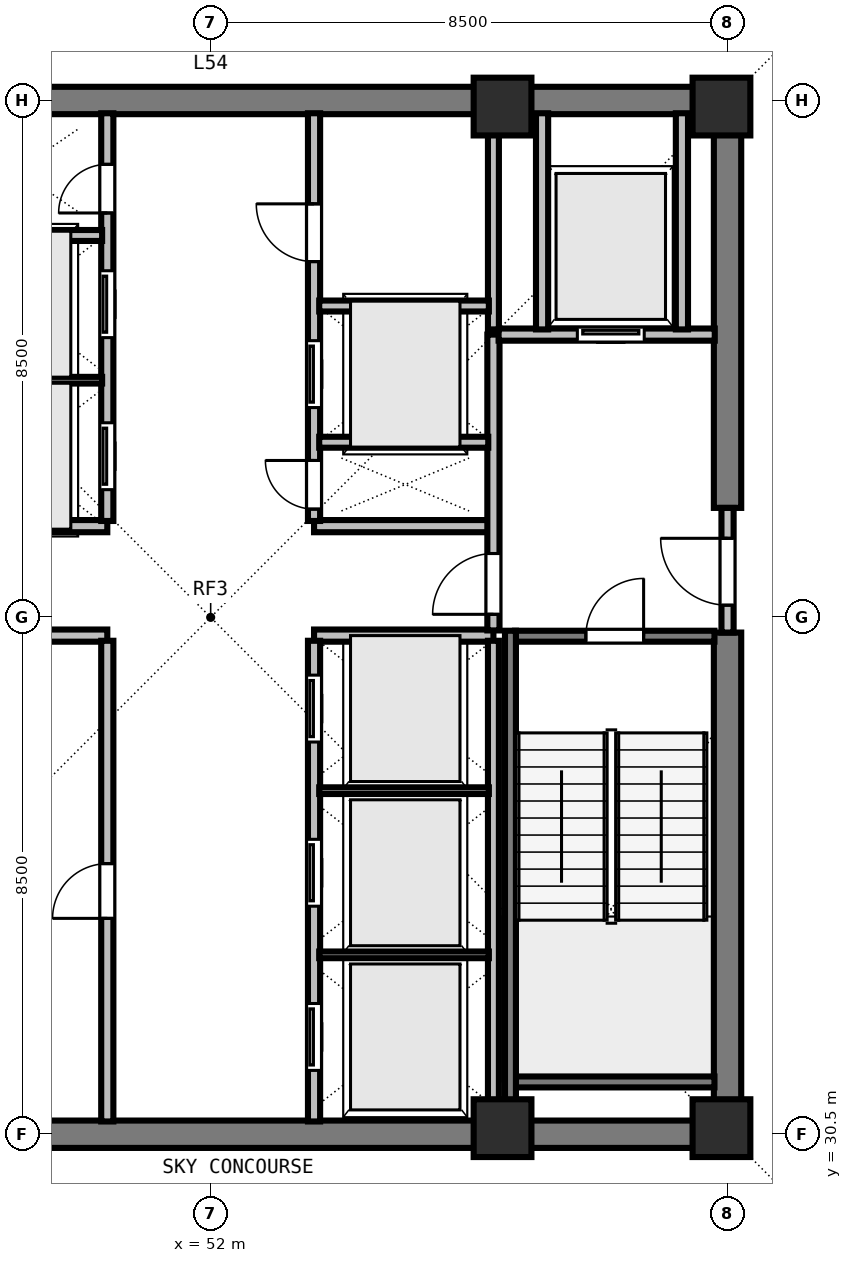
"""IFC4 building model, lengths in metres.
Left out: names, types, materials, properties, quantities, classifications, styles, units other than length and angle.
Written with IfcOpenShell. Run it as: python <this file> out.ifc"""

import sys

from ifc_helpers import new_model, si_unit, direction, frame, frame_2d, origin, origin_2d, place, context, subcontext, project, spatial, rectangle, extrude, element, fill, save


model = new_model("IFC4")
c1 = context("Model", 3, precision=1e-05, world=origin(), true_north=direction((0.0, 1.0)))
c2 = subcontext(c1, "Body", "Model", "MODEL_VIEW")
j1 = project(units=[si_unit("LENGTHUNIT", "METRE"), si_unit("PLANEANGLEUNIT", "RADIAN")], contexts=[c1])
p1 = place(None, origin())
s1 = spatial("IfcSite", under=j1, at=p1, CompositionType="ELEMENT")
p2 = place(p1, origin())
s2 = spatial("IfcBuilding", under=s1, at=p2, CompositionType="ELEMENT")
p3 = place(p2, frame((0.0, 0.0, 198.0)))
s3 = spatial("IfcBuildingStorey", under=s2, at=p3, CompositionType="ELEMENT", Elevation=198.0)
for number, where, z_axis, x_axis in (
    (1, (56.8, 30.6, 0.0), (0.0, 0.0, 1.0), (1.0, 0.0, 0.0)),
    (2, (60.4, 30.6, 0.0), (0.0, 0.0, 1.0), (1.0, 0.0, 0.0)),
    (3, (56.8, 47.4, 0.0), (0.0, 0.0, 1.0), (1.0, 0.0, 0.0)),
    (4, (60.4, 47.4, 0.0), (0.0, 0.0, 1.0), (1.0, 0.0, 0.0)),
):
    element("IfcColumn", number, at=place(p3, frame(where, z_axis=z_axis, x_axis=x_axis)), inside=s3, PredefinedType="COLUMN", context=c2, shape_type="SweptSolid", body=[
        extrude(rectangle(XDim=0.95, YDim=0.95, at=origin_2d()), origin(), (0.0, 0.0, 1.0), 4.5),
    ])
for number, where, z_axis, x_axis in (
    (5, (43.275, 30.5, 0.0), (0.0, 0.0, 1.0), (1.0, 0.0, 0.0)),
    (6, (43.275, 47.5, 0.0), (0.0, 0.0, 1.0), (1.0, 0.0, 0.0)),
):
    element("IfcWall", number, at=place(p3, frame(where, z_axis=z_axis, x_axis=x_axis)), inside=s3, PredefinedType="SHEAR", context=c2, shape_type="SweptSolid", body=[
        extrude(rectangle(XDim=17.45, YDim=0.45, at=frame_2d((8.725, 0.0))), origin(), (0.0, 0.0, 1.0), 4.29),
    ])
p4 = place(p3, frame((60.5, 30.715, 0.0), z_axis=(0.0, 0.0, 1.0), x_axis=(0.0, 1.0, 0.0)))
e7 = element("IfcWall", 7, at=p4, inside=s3, PredefinedType="SHEAR", context=c2, shape_type="SweptSolid", body=[
    extrude(rectangle(XDim=8.035, YDim=0.45, at=frame_2d((4.018, 0.0))), origin(), (0.0, 0.0, 1.0), 4.29),
])
p5 = place(p3, frame((60.5, 40.8, 0.0), z_axis=(0.0, 0.0, 1.0), x_axis=(0.0, 1.0, 0.0)))
e8 = element("IfcWall", 8, at=p5, inside=s3, PredefinedType="SHEAR", context=c2, shape_type="SweptSolid", body=[
    extrude(rectangle(XDim=6.485, YDim=0.45, at=frame_2d((3.242, 0.0))), origin(), (0.0, 0.0, 1.0), 4.29),
])
for number, where, z_axis, x_axis in (
    (9, (47.35, 38.7, 0.0), (0.0, 0.0, 1.0), (1.0, 0.0, 0.0)),
    (10, (47.35, 40.5, 0.0), (0.0, 0.0, 1.0), (1.0, 0.0, 0.0)),
    (11, (53.7, 38.7, 0.0), (0.0, 0.0, 1.0), (1.0, 0.0, 0.0)),
    (12, (53.7, 40.5, 0.0), (0.0, 0.0, 1.0), (1.0, 0.0, 0.0)),
):
    element("IfcWall", number, at=place(p3, frame(where, z_axis=z_axis, x_axis=x_axis)), inside=s3, PredefinedType="SOLIDWALL", context=c2, shape_type="SweptSolid", body=[
        extrude(rectangle(XDim=2.95, YDim=0.2, at=frame_2d((1.475, 0.0))), origin(), (0.0, 0.0, 1.0), 4.29),
    ])
p6 = place(p3, frame((50.3, 30.71, 0.0), z_axis=(0.0, 0.0, 1.0), x_axis=(0.0, 1.0, 0.0)))
e13 = element("IfcWall", 13, at=p6, inside=s3, PredefinedType="SOLIDWALL", context=c2, shape_type="SweptSolid", body=[
    extrude(rectangle(XDim=7.905, YDim=0.2, at=frame_2d((3.953, 0.0))), origin(), (0.0, 0.0, 1.0), 4.29),
])
p7 = place(p6, frame((3.34, 0.0, 0.0)))
e14 = element("IfcOpeningElement", 14, at=p7, cuts=e13, PredefinedType="OPENING", context=c2, shape_type="SweptSolid", body=[
    extrude(rectangle(XDim=0.9, YDim=2.12, at=frame_2d((0.45, 1.06))), frame((0.0, 0.11, 0.0), z_axis=(0.0, -1.0, 0.0), x_axis=(1.0, 0.0, 0.0)), (0.0, 0.0, 1.0), 0.22),
])
p8 = place(p3, frame((53.7, 30.71, 0.0), z_axis=(0.0, 0.0, 1.0), x_axis=(0.0, 1.0, 0.0)))
e15 = element("IfcWall", 15, at=p8, inside=s3, PredefinedType="SOLIDWALL", context=c2, shape_type="SweptSolid", body=[
    extrude(rectangle(XDim=7.905, YDim=0.2, at=frame_2d((3.953, 0.0))), origin(), (0.0, 0.0, 1.0), 4.29),
])
p9 = place(p8, frame((0.84, 0.0, 0.0)))
e16 = element("IfcOpeningElement", 16, at=p9, cuts=e15, PredefinedType="OPENING", context=c2, shape_type="SweptSolid", body=[
    extrude(rectangle(XDim=1.1, YDim=2.2, at=frame_2d((0.55, 1.1))), frame((0.0, 0.11, 0.0), z_axis=(0.0, -1.0, 0.0), x_axis=(1.0, 0.0, 0.0)), (0.0, 0.0, 1.0), 0.22),
])
p10 = place(p8, frame((3.54, 0.0, 0.0)))
e17 = element("IfcOpeningElement", 17, at=p10, cuts=e15, PredefinedType="OPENING", context=c2, shape_type="SweptSolid", body=[
    extrude(rectangle(XDim=1.1, YDim=2.2, at=frame_2d((0.55, 1.1))), frame((0.0, 0.11, 0.0), z_axis=(0.0, -1.0, 0.0), x_axis=(1.0, 0.0, 0.0)), (0.0, 0.0, 1.0), 0.22),
])
p11 = place(p8, frame((6.24, 0.0, 0.0)))
e18 = element("IfcOpeningElement", 18, at=p11, cuts=e15, PredefinedType="OPENING", context=c2, shape_type="SweptSolid", body=[
    extrude(rectangle(XDim=1.1, YDim=2.2, at=frame_2d((0.55, 1.1))), frame((0.0, 0.11, 0.0), z_axis=(0.0, -1.0, 0.0), x_axis=(1.0, 0.0, 0.0)), (0.0, 0.0, 1.0), 0.22),
])
p12 = place(p3, frame((50.3, 40.585, 0.0), z_axis=(0.0, 0.0, 1.0), x_axis=(0.0, 1.0, 0.0)))
e19 = element("IfcWall", 19, at=p12, inside=s3, PredefinedType="SOLIDWALL", context=c2, shape_type="SweptSolid", body=[
    extrude(rectangle(XDim=6.705, YDim=0.2, at=frame_2d((3.353, 0.0))), origin(), (0.0, 0.0, 1.0), 4.29),
])
p13 = place(p12, frame((0.515, 0.0, 0.0)))
e20 = element("IfcOpeningElement", 20, at=p13, cuts=e19, PredefinedType="OPENING", context=c2, shape_type="SweptSolid", body=[
    extrude(rectangle(XDim=1.1, YDim=2.2, at=frame_2d((0.55, 1.1))), frame((0.0, 0.11, 0.0), z_axis=(0.0, -1.0, 0.0), x_axis=(1.0, 0.0, 0.0)), (0.0, 0.0, 1.0), 0.22),
])
p14 = place(p12, frame((3.015, 0.0, 0.0)))
e21 = element("IfcOpeningElement", 21, at=p14, cuts=e19, PredefinedType="OPENING", context=c2, shape_type="SweptSolid", body=[
    extrude(rectangle(XDim=1.1, YDim=2.2, at=frame_2d((0.55, 1.1))), frame((0.0, 0.11, 0.0), z_axis=(0.0, -1.0, 0.0), x_axis=(1.0, 0.0, 0.0)), (0.0, 0.0, 1.0), 0.22),
])
p15 = place(p12, frame((5.065, 0.0, 0.0)))
e22 = element("IfcOpeningElement", 22, at=p15, cuts=e19, PredefinedType="OPENING", context=c2, shape_type="SweptSolid", body=[
    extrude(rectangle(XDim=0.8, YDim=2.08, at=frame_2d((0.4, 1.04))), frame((0.0, 0.11, 0.0), z_axis=(0.0, -1.0, 0.0), x_axis=(1.0, 0.0, 0.0)), (0.0, 0.0, 1.0), 0.22),
])
p16 = place(p3, frame((53.7, 40.585, 0.0), z_axis=(0.0, 0.0, 1.0), x_axis=(0.0, 1.0, 0.0)))
e23 = element("IfcWall", 23, at=p16, inside=s3, PredefinedType="SOLIDWALL", context=c2, shape_type="SweptSolid", body=[
    extrude(rectangle(XDim=6.705, YDim=0.2, at=frame_2d((3.353, 0.0))), origin(), (0.0, 0.0, 1.0), 4.29),
])
p17 = place(p16, frame((0.195, 0.0, 0.0)))
e24 = element("IfcOpeningElement", 24, at=p17, cuts=e23, PredefinedType="OPENING", context=c2, shape_type="SweptSolid", body=[
    extrude(rectangle(XDim=0.8, YDim=2.08, at=frame_2d((0.4, 1.04))), frame((0.0, 0.11, 0.0), z_axis=(0.0, -1.0, 0.0), x_axis=(1.0, 0.0, 0.0)), (0.0, 0.0, 1.0), 0.22),
])
p18 = place(p16, frame((1.865, 0.0, 0.0)))
e25 = element("IfcOpeningElement", 25, at=p18, cuts=e23, PredefinedType="OPENING", context=c2, shape_type="SweptSolid", body=[
    extrude(rectangle(XDim=1.1, YDim=2.2, at=frame_2d((0.55, 1.1))), frame((0.0, 0.11, 0.0), z_axis=(0.0, -1.0, 0.0), x_axis=(1.0, 0.0, 0.0)), (0.0, 0.0, 1.0), 0.22),
])
p19 = place(p16, frame((4.265, 0.0, 0.0)))
e26 = element("IfcOpeningElement", 26, at=p19, cuts=e23, PredefinedType="OPENING", context=c2, shape_type="SweptSolid", body=[
    extrude(rectangle(XDim=0.95, YDim=2.12, at=frame_2d((0.475, 1.06))), frame((0.0, 0.11, 0.0), z_axis=(0.0, -1.0, 0.0), x_axis=(1.0, 0.0, 0.0)), (0.0, 0.0, 1.0), 0.22),
])
p20 = place(p3, frame((60.5, 38.75, 0.0), z_axis=(0.0, 0.0, 1.0), x_axis=(0.0, 1.0, 0.0)))
e27 = element("IfcWall", 27, at=p20, inside=s3, PredefinedType="SOLIDWALL", context=c2, shape_type="SweptSolid", body=[
    extrude(rectangle(XDim=2.05, YDim=0.2, at=frame_2d((1.025, 0.0))), origin(), (0.0, 0.0, 1.0), 4.29),
])
p21 = place(p20, frame((0.45, 0.0, 0.0)))
e28 = element("IfcOpeningElement", 28, at=p21, cuts=e27, PredefinedType="OPENING", context=c2, shape_type="SweptSolid", body=[
    extrude(rectangle(XDim=1.1, YDim=2.15, at=frame_2d((0.55, 1.075))), frame((0.0, 0.11, 0.0), z_axis=(0.0, -1.0, 0.0), x_axis=(1.0, 0.0, 0.0)), (0.0, 0.0, 1.0), 0.22),
])
p22 = place(p3, frame((56.65, 38.785, 0.0), z_axis=(0.0, 0.0, 1.0), x_axis=(0.0, 1.0, 0.0)))
e29 = element("IfcWall", 29, at=p22, inside=s3, PredefinedType="SOLIDWALL", context=c2, shape_type="SweptSolid", body=[
    extrude(rectangle(XDim=4.865, YDim=0.2, at=frame_2d((2.433, 0.0))), origin(), (0.0, 0.0, 1.0), 4.29),
])
p23 = place(p22, frame((0.265, 0.0, 0.0)))
e30 = element("IfcOpeningElement", 30, at=p23, cuts=e29, PredefinedType="OPENING", context=c2, shape_type="SweptSolid", body=[
    extrude(rectangle(XDim=1.0, YDim=2.15, at=frame_2d((0.5, 1.075))), frame((0.0, 0.11, 0.0), z_axis=(0.0, -1.0, 0.0), x_axis=(1.0, 0.0, 0.0)), (0.0, 0.0, 1.0), 0.22),
])
p24 = place(p3, frame((56.735, 43.65, 0.0), z_axis=(0.0, 0.0, 1.0), x_axis=(1.0, 0.0, 0.0)))
e31 = element("IfcWall", 31, at=p24, inside=s3, PredefinedType="SOLIDWALL", context=c2, shape_type="SweptSolid", body=[
    extrude(rectangle(XDim=3.555, YDim=0.2, at=frame_2d((1.777, 0.0))), origin(), (0.0, 0.0, 1.0), 4.29),
])
p25 = place(p24, frame((1.295, 0.0, 0.0)))
e32 = element("IfcOpeningElement", 32, at=p25, cuts=e31, PredefinedType="OPENING", context=c2, shape_type="SweptSolid", body=[
    extrude(rectangle(XDim=1.1, YDim=2.2, at=frame_2d((0.55, 1.1))), frame((0.0, 0.11, 0.0), z_axis=(0.0, -1.0, 0.0), x_axis=(1.0, 0.0, 0.0)), (0.0, 0.0, 1.0), 0.22),
])
for number, where, z_axis, x_axis in (
    (33, (57.45, 43.735, 0.0), (0.0, 0.0, 1.0), (0.0, 1.0, 0.0)),
    (34, (59.75, 43.735, 0.0), (0.0, 0.0, 1.0), (0.0, 1.0, 0.0)),
):
    element("IfcWall", number, at=place(p3, frame(where, z_axis=z_axis, x_axis=x_axis)), inside=s3, PredefinedType="SOLIDWALL", context=c2, shape_type="SweptSolid", body=[
        extrude(rectangle(XDim=3.555, YDim=0.2, at=frame_2d((1.777, 0.0))), origin(), (0.0, 0.0, 1.0), 4.29),
    ])
p26 = place(p3, frame((56.65, 30.71, 0.0), z_axis=(0.0, 0.0, 1.0), x_axis=(0.0, 1.0, 0.0)))
e35 = element("IfcWall", 35, at=p26, inside=s3, PredefinedType="SOLIDWALL", context=c2, shape_type="SweptSolid", body=[
    extrude(rectangle(XDim=7.905, YDim=0.18, at=frame_2d((3.953, 0.0))), origin(), (0.0, 0.0, 1.0), 4.29),
])
for number, where, z_axis, x_axis in (
    (36, (53.785, 33.45, 0.0), (0.0, 0.0, 1.0), (1.0, 0.0, 0.0)),
    (37, (53.785, 36.15, 0.0), (0.0, 0.0, 1.0), (1.0, 0.0, 0.0)),
):
    element("IfcWall", number, at=place(p3, frame(where, z_axis=z_axis, x_axis=x_axis)), inside=s3, PredefinedType="PARTITIONING", context=c2, shape_type="SweptSolid", body=[
        extrude(rectangle(XDim=2.79, YDim=0.11, at=frame_2d((1.395, 0.0))), origin(), (0.0, 0.0, 1.0), 4.29),
    ])
p27 = place(p3, frame((47.435, 42.9, 0.0), z_axis=(0.0, 0.0, 1.0), x_axis=(1.0, 0.0, 0.0)))
e38 = element("IfcWall", 38, at=p27, inside=s3, PredefinedType="PARTITIONING", context=c2, shape_type="SweptSolid", body=[
    extrude(rectangle(XDim=2.78, YDim=0.11, at=frame_2d((1.39, 0.0))), origin(), (0.0, 0.0, 1.0), 4.29),
])
p28 = place(p3, frame((47.425, 45.28, 0.0), z_axis=(0.0, 0.0, 1.0), x_axis=(1.0, 0.0, 0.0)))
e39 = element("IfcWall", 39, at=p28, inside=s3, PredefinedType="SOLIDWALL", context=c2, shape_type="SweptSolid", body=[
    extrude(rectangle(XDim=2.79, YDim=0.18, at=frame_2d((1.395, 0.0))), origin(), (0.0, 0.0, 1.0), 4.29),
])
p29 = place(p3, frame((56.65, 43.735, 0.0), z_axis=(0.0, 0.0, 1.0), x_axis=(0.0, 1.0, 0.0)))
e40 = element("IfcWall", 40, at=p29, inside=s3, PredefinedType="SOLIDWALL", context=c2, shape_type="SweptSolid", body=[
    extrude(rectangle(XDim=3.555, YDim=0.18, at=frame_2d((1.777, 0.0))), origin(), (0.0, 0.0, 1.0), 4.29),
])
p30 = place(p3, frame((53.785, 41.88, 0.0), z_axis=(0.0, 0.0, 1.0), x_axis=(1.0, 0.0, 0.0)))
e41 = element("IfcWall", 41, at=p30, inside=s3, PredefinedType="SOLIDWALL", context=c2, shape_type="SweptSolid", body=[
    extrude(rectangle(XDim=2.78, YDim=0.18, at=frame_2d((1.39, 0.0))), origin(), (0.0, 0.0, 1.0), 4.29),
])
p31 = place(p3, frame((53.785, 44.12, 0.0), z_axis=(0.0, 0.0, 1.0), x_axis=(1.0, 0.0, 0.0)))
e42 = element("IfcWall", 42, at=p31, inside=s3, PredefinedType="SOLIDWALL", context=c2, shape_type="SweptSolid", body=[
    extrude(rectangle(XDim=2.79, YDim=0.18, at=frame_2d((1.395, 0.0))), origin(), (0.0, 0.0, 1.0), 4.29),
])
p32 = place(p3, frame((57.005, 38.69, 0.0), z_axis=(0.0, 0.0, 1.0), x_axis=(1.0, 0.0, 0.0)))
e43 = element("IfcWall", 43, at=p32, inside=s3, PredefinedType="SOLIDWALL", context=c2, shape_type="SweptSolid", body=[
    extrude(rectangle(XDim=3.28, YDim=0.18, at=frame_2d((1.64, 0.0))), origin(), (0.0, 0.0, 1.0), 4.29),
])
p33 = place(p32, frame((1.165, 0.0, 0.0)))
e44 = element("IfcOpeningElement", 44, at=p33, cuts=e43, PredefinedType="OPENING", context=c2, shape_type="SweptSolid", body=[
    extrude(rectangle(XDim=0.95, YDim=2.15, at=frame_2d((0.475, 1.075))), frame((0.0, 0.1, 0.0), z_axis=(0.0, -1.0, 0.0), x_axis=(1.0, 0.0, 0.0)), (0.0, 0.0, 1.0), 0.2),
])
p34 = place(p3, frame((57.005, 31.36, 0.0), z_axis=(0.0, 0.0, 1.0), x_axis=(1.0, 0.0, 0.0)))
e45 = element("IfcWall", 45, at=p34, inside=s3, PredefinedType="SOLIDWALL", context=c2, shape_type="SweptSolid", body=[
    extrude(rectangle(XDim=3.28, YDim=0.18, at=frame_2d((1.64, 0.0))), origin(), (0.0, 0.0, 1.0), 4.29),
])
p35 = place(p3, frame((56.93, 38.78, 0.0), z_axis=(0.0, 0.0, 1.0), x_axis=(0.0, -1.0, 0.0)))
e46 = element("IfcWall", 46, at=p35, inside=s3, PredefinedType="SOLIDWALL", context=c2, shape_type="SweptSolid", body=[
    extrude(rectangle(XDim=8.067, YDim=0.18, at=frame_2d((4.034, 0.0))), origin(), (0.0, 0.0, 1.0), 4.29),
])
p36 = place(p21, origin())
e47 = element("IfcDoor", 47, at=p36, inside=s3, OperationType="SINGLE_SWING_RIGHT", PredefinedType="DOOR", context=c2, shape_type="SweptSolid", body=[
    extrude(rectangle(XDim=1.1, YDim=2.15, at=frame_2d((0.55, 1.075))), frame((0.0, 0.025, 0.0), z_axis=(0.0, -1.0, 0.0), x_axis=(1.0, 0.0, 0.0)), (0.0, 0.0, 1.0), 0.05),
])
fill(e28, e47)
p37 = place(p23, origin())
e48 = element("IfcDoor", 48, at=p37, inside=s3, OperationType="SINGLE_SWING_LEFT", PredefinedType="DOOR", context=c2, shape_type="SweptSolid", body=[
    extrude(rectangle(XDim=1.0, YDim=2.15, at=frame_2d((0.5, 1.075))), frame((0.0, 0.025, 0.0), z_axis=(0.0, -1.0, 0.0), x_axis=(1.0, 0.0, 0.0)), (0.0, 0.0, 1.0), 0.05),
])
fill(e30, e48)
p38 = place(p25, origin())
e49 = element("IfcDoor", 49, at=p38, inside=s3, OperationType="SLIDING_TO_LEFT", PredefinedType="DOOR", context=c2, shape_type="SweptSolid", body=[
    extrude(rectangle(XDim=1.1, YDim=2.2, at=frame_2d((0.55, 1.1))), frame((0.0, 0.025, 0.0), z_axis=(0.0, -1.0, 0.0), x_axis=(1.0, 0.0, 0.0)), (0.0, 0.0, 1.0), 0.05),
])
fill(e32, e49)
p39 = place(p7, origin())
e50 = element("IfcDoor", 50, at=p39, inside=s3, OperationType="SINGLE_SWING_LEFT", PredefinedType="DOOR", context=c2, shape_type="SweptSolid", body=[
    extrude(rectangle(XDim=0.9, YDim=2.12, at=frame_2d((0.45, 1.06))), frame((0.0, 0.025, 0.0), z_axis=(0.0, -1.0, 0.0), x_axis=(1.0, 0.0, 0.0)), (0.0, 0.0, 1.0), 0.05),
])
fill(e14, e50)
p40 = place(p9, origin())
e51 = element("IfcDoor", 51, at=p40, inside=s3, OperationType="SLIDING_TO_LEFT", PredefinedType="DOOR", context=c2, shape_type="SweptSolid", body=[
    extrude(rectangle(XDim=1.1, YDim=2.2, at=frame_2d((0.55, 1.1))), frame((0.0, 0.025, 0.0), z_axis=(0.0, -1.0, 0.0), x_axis=(1.0, 0.0, 0.0)), (0.0, 0.0, 1.0), 0.05),
])
fill(e16, e51)
p41 = place(p10, origin())
e52 = element("IfcDoor", 52, at=p41, inside=s3, OperationType="SLIDING_TO_LEFT", PredefinedType="DOOR", context=c2, shape_type="SweptSolid", body=[
    extrude(rectangle(XDim=1.1, YDim=2.2, at=frame_2d((0.55, 1.1))), frame((0.0, 0.025, 0.0), z_axis=(0.0, -1.0, 0.0), x_axis=(1.0, 0.0, 0.0)), (0.0, 0.0, 1.0), 0.05),
])
fill(e17, e52)
p42 = place(p11, origin())
e53 = element("IfcDoor", 53, at=p42, inside=s3, OperationType="SLIDING_TO_LEFT", PredefinedType="DOOR", context=c2, shape_type="SweptSolid", body=[
    extrude(rectangle(XDim=1.1, YDim=2.2, at=frame_2d((0.55, 1.1))), frame((0.0, 0.025, 0.0), z_axis=(0.0, -1.0, 0.0), x_axis=(1.0, 0.0, 0.0)), (0.0, 0.0, 1.0), 0.05),
])
fill(e18, e53)
p43 = place(p13, origin())
e54 = element("IfcDoor", 54, at=p43, inside=s3, OperationType="SLIDING_TO_LEFT", PredefinedType="DOOR", context=c2, shape_type="SweptSolid", body=[
    extrude(rectangle(XDim=1.1, YDim=2.2, at=frame_2d((0.55, 1.1))), frame((0.0, 0.025, 0.0), z_axis=(0.0, -1.0, 0.0), x_axis=(1.0, 0.0, 0.0)), (0.0, 0.0, 1.0), 0.05),
])
fill(e20, e54)
p44 = place(p14, origin())
e55 = element("IfcDoor", 55, at=p44, inside=s3, OperationType="SLIDING_TO_LEFT", PredefinedType="DOOR", context=c2, shape_type="SweptSolid", body=[
    extrude(rectangle(XDim=1.1, YDim=2.2, at=frame_2d((0.55, 1.1))), frame((0.0, 0.025, 0.0), z_axis=(0.0, -1.0, 0.0), x_axis=(1.0, 0.0, 0.0)), (0.0, 0.0, 1.0), 0.05),
])
fill(e21, e55)
p45 = place(p15, origin())
e56 = element("IfcDoor", 56, at=p45, inside=s3, OperationType="SINGLE_SWING_LEFT", PredefinedType="DOOR", context=c2, shape_type="SweptSolid", body=[
    extrude(rectangle(XDim=0.8, YDim=2.08, at=frame_2d((0.4, 1.04))), frame((0.0, 0.025, 0.0), z_axis=(0.0, -1.0, 0.0), x_axis=(1.0, 0.0, 0.0)), (0.0, 0.0, 1.0), 0.05),
])
fill(e22, e56)
p46 = place(p17, origin())
e57 = element("IfcDoor", 57, at=p46, inside=s3, OperationType="SINGLE_SWING_RIGHT", PredefinedType="DOOR", context=c2, shape_type="SweptSolid", body=[
    extrude(rectangle(XDim=0.8, YDim=2.08, at=frame_2d((0.4, 1.04))), frame((0.0, 0.025, 0.0), z_axis=(0.0, -1.0, 0.0), x_axis=(1.0, 0.0, 0.0)), (0.0, 0.0, 1.0), 0.05),
])
fill(e24, e57)
p47 = place(p18, origin())
e58 = element("IfcDoor", 58, at=p47, inside=s3, OperationType="SLIDING_TO_LEFT", PredefinedType="DOOR", context=c2, shape_type="SweptSolid", body=[
    extrude(rectangle(XDim=1.1, YDim=2.2, at=frame_2d((0.55, 1.1))), frame((0.0, 0.025, 0.0), z_axis=(0.0, -1.0, 0.0), x_axis=(1.0, 0.0, 0.0)), (0.0, 0.0, 1.0), 0.05),
])
fill(e25, e58)
p48 = place(p19, origin())
e59 = element("IfcDoor", 59, at=p48, inside=s3, OperationType="SINGLE_SWING_RIGHT", PredefinedType="DOOR", context=c2, shape_type="SweptSolid", body=[
    extrude(rectangle(XDim=0.95, YDim=2.12, at=frame_2d((0.475, 1.06))), frame((0.0, 0.025, 0.0), z_axis=(0.0, -1.0, 0.0), x_axis=(1.0, 0.0, 0.0)), (0.0, 0.0, 1.0), 0.05),
])
fill(e26, e59)
p49 = place(p33, origin())
e60 = element("IfcDoor", 60, at=p49, inside=s3, OperationType="SINGLE_SWING_RIGHT", PredefinedType="DOOR", context=c2, shape_type="SweptSolid", body=[
    extrude(rectangle(XDim=0.95, YDim=2.15, at=frame_2d((0.475, 1.075))), frame((0.0, 0.025, 0.0), z_axis=(0.0, -1.0, 0.0), x_axis=(1.0, 0.0, 0.0)), (0.0, 0.0, 1.0), 0.05),
])
fill(e44, e60)
save(model, sys.argv[1])
